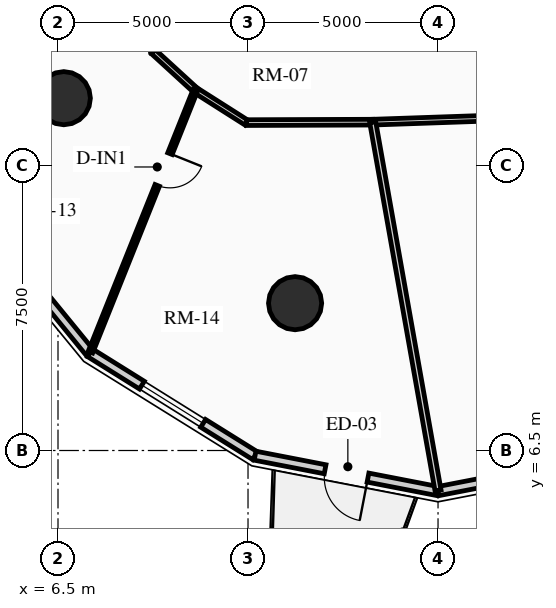
"""IFC4 building model, lengths in metres.
Left out: names, types, materials, properties, quantities, classifications, styles, units other than length and angle.
Written with IfcOpenShell. Run it as: python <this file> out.ifc"""

import sys

from ifc_helpers import new_model, si_unit, direction, frame, frame_2d, origin, origin_2d, place, context, subcontext, project, spatial, rectangle, circle, extrude, source, transform, mapped, element, fill, save


model = new_model("IFC4")
c1 = context("Model", 3, precision=1e-05, world=origin(), true_north=direction((0.0, 1.0)))
c2 = subcontext(c1, "Body", "Model", "MODEL_VIEW")
j1 = project(units=[si_unit("LENGTHUNIT", "METRE"), si_unit("PLANEANGLEUNIT", "RADIAN")], contexts=[c1])
p1 = place(None, origin())
s1 = spatial("IfcSite", under=j1, at=p1, CompositionType="ELEMENT")
p2 = place(p1, origin())
s2 = spatial("IfcBuilding", under=s1, at=p2, CompositionType="ELEMENT")
p3 = place(p2, frame((0.0, 0.0, 113.8)))
s3 = spatial("IfcBuildingStorey", under=s2, at=p3, CompositionType="ELEMENT", Elevation=113.8)
for number, where, z_axis, x_axis in (
    (1, (6.653, 15.771, 0.0), (0.0, 0.0, 1.0), (1.0, 0.0, 0.0)),
    (2, (12.739, 10.377, 0.0), (0.0, 0.0, 1.0), (1.0, 0.0, 0.0)),
):
    element("IfcColumn", number, at=place(p3, frame(where, z_axis=z_axis, x_axis=x_axis)), inside=s3, PredefinedType="USERDEFINED", context=c2, shape_type="SweptSolid", body=[
        extrude(circle(Radius=0.7, at=origin_2d()), origin(), (0.0, 0.0, 1.0), 2.91),
    ])
p4 = place(p3, frame((7.342, 9.072, 0.0), z_axis=(0.0, 0.0, 1.0), x_axis=(-0.632700781152, 0.77439635945, 0.0)))
e3 = element("IfcWall", 3, at=p4, inside=s3, PredefinedType="SOLIDWALL", context=c2, shape_type="SweptSolid", body=[
    extrude(rectangle(XDim=5.448, YDim=0.24, at=frame_2d((2.724, 0.0))), origin(), (0.0, 0.0, 1.0), 2.179),
])
p5 = place(p3, frame((11.685, 6.363, 0.0), z_axis=(0.0, 0.0, 1.0), x_axis=(-0.848520380187, 0.529162701263, 0.0)))
e4 = element("IfcWall", 4, at=p5, inside=s3, PredefinedType="SOLIDWALL", context=c2, shape_type="SweptSolid", body=[
    extrude(rectangle(XDim=5.119, YDim=0.24, at=frame_2d((2.56, 0.0))), origin(), (0.0, 0.0, 1.0), 2.179),
])
m1 = source(origin(), c2, "Body", "SweptSolid", [
    extrude(rectangle(XDim=1.9, YDim=1.35, at=frame_2d((0.95, 0.675))), frame((0.0, 0.13, 0.0), z_axis=(0.0, -1.0, 0.0), x_axis=(1.0, 0.0, 0.0)), (0.0, 0.0, 1.0), 0.26),
])
p6 = place(p5, frame((1.609, 0.0, 0.65)))
e5 = element("IfcOpeningElement", 5, at=p6, cuts=e4, PredefinedType="OPENING", context=c2, shape_type="MappedRepresentation", body=[
    mapped(m1, transform((0.0, 0.0, 0.0), x_axis=(1.0, 0.0, 0.0), y_axis=(0.0, 1.0, 0.0), z_axis=(0.0, 0.0, 1.0), scale=1.0)),
])
p7 = place(p3, frame((16.5, 5.43, 0.0), z_axis=(0.0, 0.0, 1.0), x_axis=(-0.981723785992, 0.190311344954, 0.0)))
e6 = element("IfcWall", 6, at=p7, inside=s3, PredefinedType="SOLIDWALL", context=c2, shape_type="SweptSolid", body=[
    extrude(rectangle(XDim=4.904, YDim=0.24, at=frame_2d((2.452, 0.0))), origin(), (0.0, 0.0, 1.0), 2.179),
])
m2 = source(origin(), c2, "Body", "SweptSolid", [
    extrude(rectangle(XDim=1.15, YDim=2.005, at=frame_2d((0.575, 1.002))), frame((0.0, 0.13, 0.0), z_axis=(0.0, -1.0, 0.0), x_axis=(1.0, 0.0, 0.0)), (0.0, 0.0, 1.0), 0.26),
])
p8 = place(p7, frame((1.877, 0.0, 0.0)))
e7 = element("IfcOpeningElement", 7, at=p8, cuts=e6, PredefinedType="OPENING", context=c2, shape_type="MappedRepresentation", body=[
    mapped(m2, transform((0.0, 0.0, 0.0), x_axis=(1.0, 0.0, 0.0), y_axis=(0.0, 1.0, 0.0), z_axis=(0.0, 0.0, 1.0), scale=1.0)),
])
p9 = place(p3, frame((21.315, 6.363, 0.0), z_axis=(0.0, 0.0, 1.0), x_axis=(-0.981723785992, -0.190311344954, 0.0)))
e8 = element("IfcWall", 8, at=p9, inside=s3, PredefinedType="SOLIDWALL", context=c2, shape_type="SweptSolid", body=[
    extrude(rectangle(XDim=4.904, YDim=0.24, at=frame_2d((2.452, 0.0))), origin(), (0.0, 0.0, 1.0), 2.179),
])
m3 = source(origin(), c2, "Body", "SweptSolid", [
    extrude(rectangle(XDim=2.2, YDim=1.35, at=frame_2d((1.1, 0.675))), frame((0.0, 0.13, 0.0), z_axis=(0.0, -1.0, 0.0), x_axis=(1.0, 0.0, 0.0)), (0.0, 0.0, 1.0), 0.26),
])
p10 = place(p9, frame((1.352, 0.0, 0.65)))
e9 = element("IfcOpeningElement", 9, at=p10, cuts=e8, PredefinedType="OPENING", context=c2, shape_type="MappedRepresentation", body=[
    mapped(m3, transform((0.0, 0.0, 0.0), x_axis=(1.0, 0.0, 0.0), y_axis=(0.0, 1.0, 0.0), z_axis=(0.0, 0.0, 1.0), scale=1.0)),
])
p11 = place(p3, frame((8.538, 18.338, 0.0), z_axis=(0.0, 0.0, 1.0), x_axis=(0.331358150167, -0.94350504838, 0.0)))
e10 = element("IfcWall", 10, at=p11, inside=s3, PredefinedType="PARTITIONING", context=c2, shape_type="SweptSolid", body=[
    extrude(rectangle(XDim=1.424, YDim=0.15, at=frame_2d((0.712, 0.0))), origin(), (0.0, 0.0, 1.0), 2.225),
])
m4 = source(origin(), c2, "Body", "SweptSolid", [
    extrude(rectangle(XDim=1.05, YDim=2.015, at=frame_2d((0.525, 1.007))), frame((0.0, 0.085, 0.0), z_axis=(0.0, -1.0, 0.0), x_axis=(1.0, 0.0, 0.0)), (0.0, 0.0, 1.0), 0.17),
])
p12 = place(p11, frame((0.12, 0.0, 0.0)))
e11 = element("IfcOpeningElement", 11, at=p12, cuts=e10, PredefinedType="OPENING", context=c2, shape_type="MappedRepresentation", body=[
    mapped(m4, transform((0.0, 0.0, 0.0), x_axis=(1.0, 0.0, 0.0), y_axis=(0.0, 1.0, 0.0), z_axis=(0.0, 0.0, 1.0), scale=1.0)),
])
p13 = place(p3, frame((9.01, 16.994, 0.0), z_axis=(0.0, 0.0, 1.0), x_axis=(0.737701798986, -0.67512669609, 0.0)))
e12 = element("IfcWall", 12, at=p13, inside=s3, PredefinedType="PARTITIONING", context=c2, shape_type="SweptSolid", body=[
    extrude(rectangle(XDim=1.498, YDim=0.15, at=frame_2d((0.749, 0.0))), origin(), (0.0, 0.0, 1.0), 2.225),
])
p14 = place(p3, frame((10.115, 15.983, 0.0), z_axis=(0.0, 0.0, 1.0), x_axis=(0.843995849351, -0.536349705209, 0.0)))
e13 = element("IfcWall", 13, at=p14, inside=s3, PredefinedType="PARTITIONING", context=c2, shape_type="SweptSolid", body=[
    extrude(rectangle(XDim=1.593, YDim=0.15, at=frame_2d((0.796, 0.0))), origin(), (0.0, 0.0, 1.0), 2.225),
])
p15 = place(p3, frame((11.46, 15.129, 0.0), z_axis=(0.0, 0.0, 1.0), x_axis=(0.999993513287, 0.003601858435, 0.0)))
e14 = element("IfcWall", 14, at=p15, inside=s3, PredefinedType="PARTITIONING", context=c2, shape_type="SweptSolid", body=[
    extrude(rectangle(XDim=3.321, YDim=0.15, at=frame_2d((1.661, 0.0))), origin(), (0.0, 0.0, 1.0), 2.225),
])
p16 = place(p3, frame((14.781, 15.141, 0.0), z_axis=(0.0, 0.0, 1.0), x_axis=(0.999407918707, 0.034406569513, 0.0)))
e15 = element("IfcWall", 15, at=p16, inside=s3, PredefinedType="PARTITIONING", context=c2, shape_type="SweptSolid", body=[
    extrude(rectangle(XDim=6.642, YDim=0.15, at=frame_2d((3.321, 0.0))), origin(), (0.0, 0.0, 1.0), 2.225),
])
p17 = place(p3, frame((14.781, 15.141, 0.0), z_axis=(0.0, 0.0, 1.0), x_axis=(0.174659805548, -0.984628839881, 0.0)))
e16 = element("IfcWall", 16, at=p17, inside=s3, PredefinedType="PARTITIONING", context=c2, shape_type="SweptSolid", body=[
    extrude(rectangle(XDim=9.842, YDim=0.16, at=frame_2d((4.921, 0.0))), origin(), (0.0, 0.0, 1.0), 2.179),
])
p18 = place(p3, frame((10.115, 15.983, 0.0), z_axis=(0.0, 0.0, 1.0), x_axis=(-0.371861013147, -0.928288417951, 0.0)))
e17 = element("IfcWall", 17, at=p18, inside=s3, PredefinedType="PARTITIONING", context=c2, shape_type="SweptSolid", body=[
    extrude(rectangle(XDim=7.427, YDim=0.125, at=frame_2d((3.714, 0.0))), origin(), (0.0, 0.0, 1.0), 2.179),
])
m5 = source(origin(), c2, "Body", "SweptSolid", [
    extrude(rectangle(XDim=0.9, YDim=2.005, at=frame_2d((0.45, 1.002))), frame((0.0, 0.073, 0.0), z_axis=(0.0, -1.0, 0.0), x_axis=(1.0, 0.0, 0.0)), (0.0, 0.0, 1.0), 0.145),
])
p19 = place(p18, frame((1.8, 0.0, 0.0)))
e18 = element("IfcOpeningElement", 18, at=p19, cuts=e17, PredefinedType="OPENING", context=c2, shape_type="MappedRepresentation", body=[
    mapped(m5, transform((0.0, 0.0, 0.0), x_axis=(1.0, 0.0, 0.0), y_axis=(0.0, 1.0, 0.0), z_axis=(0.0, 0.0, 1.0), scale=1.0)),
])
m6 = source(origin(), c2, "Body", "SweptSolid", [
    extrude(rectangle(XDim=1.9, YDim=1.35, at=frame_2d((0.95, 0.675))), frame((0.0, 0.03, 0.0), z_axis=(0.0, -1.0, 0.0), x_axis=(1.0, 0.0, 0.0)), (0.0, 0.0, 1.0), 0.06),
])
p20 = place(p6, origin())
e19 = element("IfcWindow", 19, at=p20, inside=s3, PartitioningType="DOUBLE_PANEL_VERTICAL", PredefinedType="WINDOW", context=c2, shape_type="MappedRepresentation", body=[
    mapped(m6, transform((0.0, 0.0, 0.0), x_axis=(1.0, 0.0, 0.0), y_axis=(0.0, 1.0, 0.0), z_axis=(0.0, 0.0, 1.0), scale=1.0)),
])
fill(e5, e19)
m7 = source(origin(), c2, "Body", "SweptSolid", [
    extrude(rectangle(XDim=1.15, YDim=2.005, at=frame_2d((0.575, 1.002))), frame((0.0, 0.025, 0.0), z_axis=(0.0, -1.0, 0.0), x_axis=(1.0, 0.0, 0.0)), (0.0, 0.0, 1.0), 0.05),
])
p21 = place(p8, origin())
e20 = element("IfcDoor", 20, at=p21, inside=s3, OperationType="SINGLE_SWING_LEFT", PredefinedType="DOOR", context=c2, shape_type="MappedRepresentation", body=[
    mapped(m7, transform((0.0, 0.0, 0.0), x_axis=(1.0, 0.0, 0.0), y_axis=(0.0, 1.0, 0.0), z_axis=(0.0, 0.0, 1.0), scale=1.0)),
])
fill(e7, e20)
m8 = source(origin(), c2, "Body", "SweptSolid", [
    extrude(rectangle(XDim=0.9, YDim=2.005, at=frame_2d((0.45, 1.002))), frame((0.0, 0.025, 0.0), z_axis=(0.0, -1.0, 0.0), x_axis=(1.0, 0.0, 0.0)), (0.0, 0.0, 1.0), 0.05),
])
p22 = place(p19, origin())
e21 = element("IfcDoor", 21, at=p22, inside=s3, OperationType="SINGLE_SWING_LEFT", PredefinedType="DOOR", context=c2, shape_type="MappedRepresentation", body=[
    mapped(m8, transform((0.0, 0.0, 0.0), x_axis=(1.0, 0.0, 0.0), y_axis=(0.0, 1.0, 0.0), z_axis=(0.0, 0.0, 1.0), scale=1.0)),
])
fill(e18, e21)
save(model, sys.argv[1])
